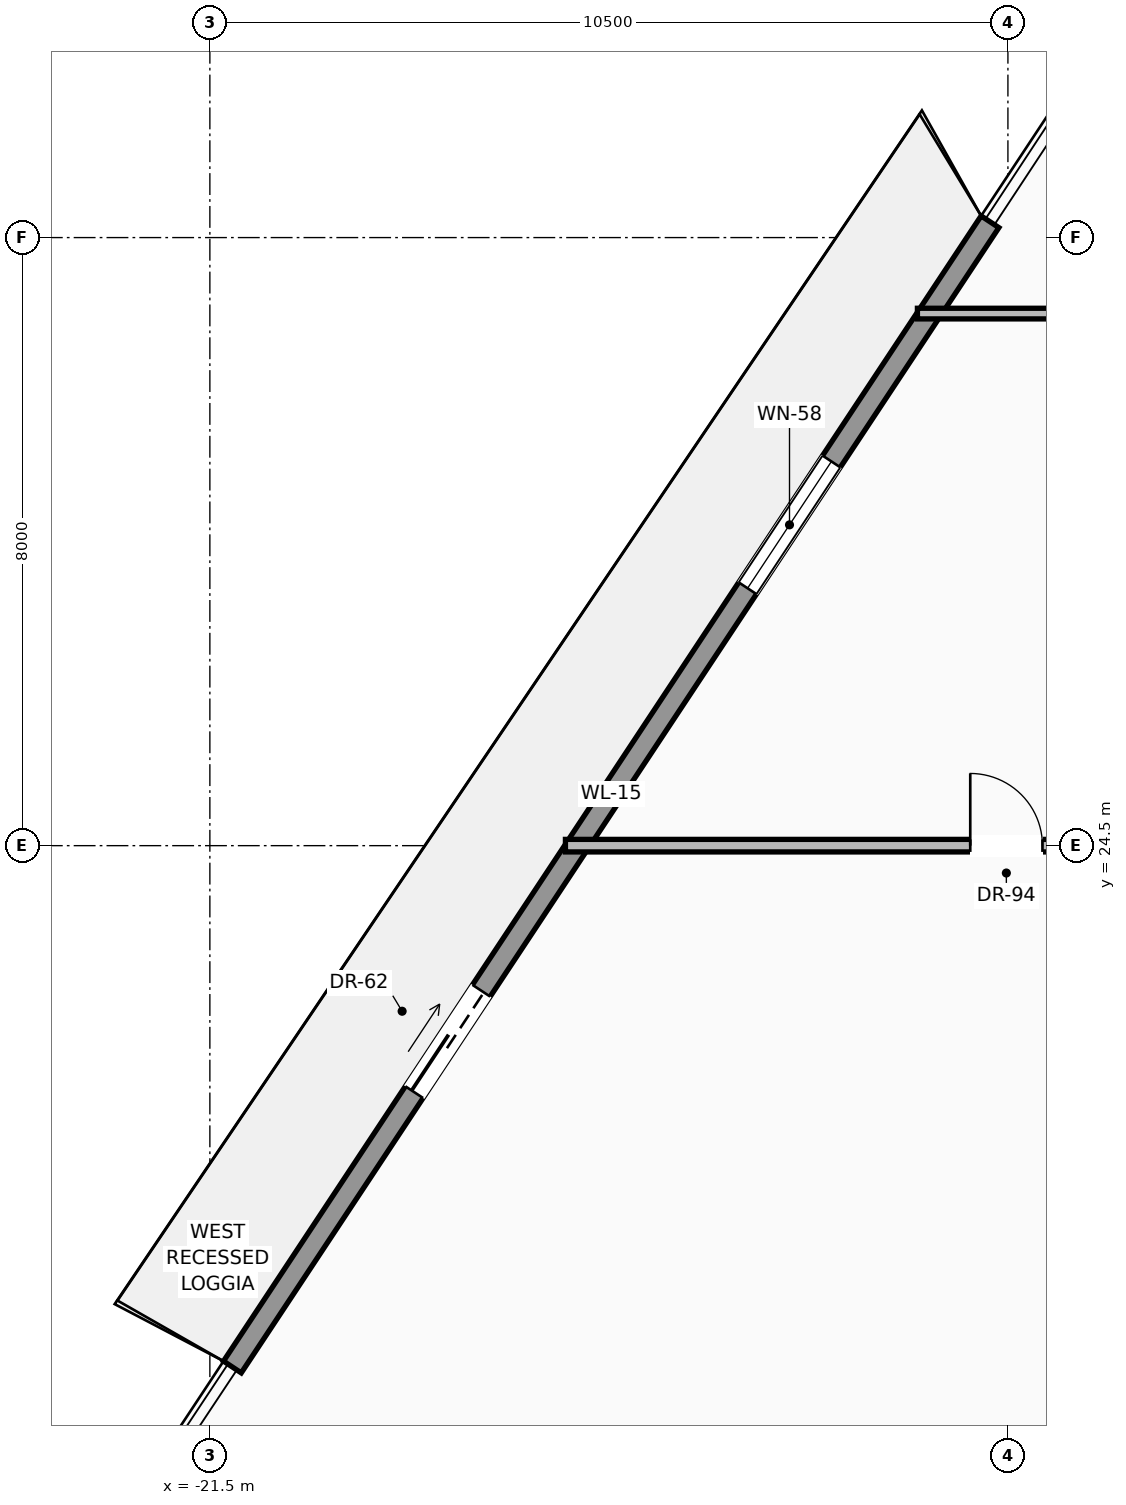
"""IFC4 building model, lengths in metres.
Left out: names, types, materials, properties, quantities, classifications, styles, units other than length and angle.
Written with IfcOpenShell. Run it as: python <this file> out.ifc"""

import sys

from ifc_helpers import new_model, si_unit, direction, frame, frame_2d, origin, place, context, subcontext, project, spatial, rectangle, extrude, source, transform, mapped, element, fill, save


model = new_model("IFC4")
c1 = context("Model", 3, precision=1e-05, world=origin(), true_north=direction((0.0, 1.0)))
c2 = subcontext(c1, "Body", "Model", "MODEL_VIEW")
j1 = project(units=[si_unit("LENGTHUNIT", "METRE"), si_unit("PLANEANGLEUNIT", "RADIAN")], contexts=[c1])
p1 = place(None, origin())
s1 = spatial("IfcSite", under=j1, at=p1, CompositionType="ELEMENT")
p2 = place(p1, origin())
s2 = spatial("IfcBuilding", under=s1, at=p2, CompositionType="ELEMENT")
p3 = place(p2, frame((0.0, 0.0, 121.0)))
s3 = spatial("IfcBuildingStorey", under=s2, at=p3, CompositionType="ELEMENT", Elevation=121.0)
p4 = place(p3, frame((-21.204, 17.641, 0.0), z_axis=(0.0, 0.0, 1.0), x_axis=(0.551762134215, 0.834001527125, 0.0)))
e1 = element("IfcWall", 1, at=p4, inside=s3, PredefinedType="SOLIDWALL", context=c2, shape_type="SweptSolid", body=[
    extrude(rectangle(XDim=18.066, YDim=0.28, at=frame_2d((9.033, 0.0))), origin(), (0.0, 0.0, 1.0), 3.95),
])
p5 = place(p4, frame((4.336, 0.0, 0.0)))
e2 = element("IfcOpeningElement", 2, at=p5, cuts=e1, PredefinedType="OPENING", context=c2, shape_type="SweptSolid", body=[
    extrude(rectangle(XDim=1.6, YDim=2.35, at=frame_2d((0.8, 1.175))), frame((0.0, 0.15, 0.0), z_axis=(0.0, -1.0, 0.0), x_axis=(1.0, 0.0, 0.0)), (0.0, 0.0, 1.0), 0.3),
])
p6 = place(p4, frame((12.285, 0.0, 0.9)))
e3 = element("IfcOpeningElement", 3, at=p6, cuts=e1, PredefinedType="OPENING", context=c2, shape_type="SweptSolid", body=[
    extrude(rectangle(XDim=2.0, YDim=1.55, at=frame_2d((1.0, 0.775))), frame((0.0, 0.15, 0.0), z_axis=(0.0, -1.0, 0.0), x_axis=(1.0, 0.0, 0.0)), (0.0, 0.0, 1.0), 0.3),
])
p7 = place(p3, frame((-16.822, 24.5, 0.0), z_axis=(0.0, 0.0, 1.0), x_axis=(1.0, 0.0, 0.0)))
e4 = element("IfcWall", 4, at=p7, inside=s3, PredefinedType="PARTITIONING", context=c2, shape_type="SweptSolid", body=[
    extrude(rectangle(XDim=34.168, YDim=0.165, at=frame_2d((17.084, 0.0))), origin(), (0.0, 0.0, 1.0), 3.746),
])
p8 = place(p7, frame((16.084, 0.0, 0.0)))
e5 = element("IfcOpeningElement", 5, at=p8, cuts=e4, PredefinedType="OPENING", context=c2, shape_type="SweptSolid", body=[
    extrude(rectangle(XDim=2.0, YDim=2.4, at=frame_2d((1.0, 1.2))), frame((0.0, 0.093, 0.0), z_axis=(0.0, -1.0, 0.0), x_axis=(1.0, 0.0, 0.0)), (0.0, 0.0, 1.0), 0.185),
])
p9 = place(p7, frame((5.326, 0.0, 0.0)))
e6 = element("IfcOpeningElement", 6, at=p9, cuts=e4, PredefinedType="OPENING", context=c2, shape_type="SweptSolid", body=[
    extrude(rectangle(XDim=0.95, YDim=2.2, at=frame_2d((0.475, 1.1))), frame((0.0, 0.093, 0.0), z_axis=(0.0, -1.0, 0.0), x_axis=(1.0, 0.0, 0.0)), (0.0, 0.0, 1.0), 0.185),
])
p10 = place(p7, frame((27.637, 0.0, 0.0)))
e7 = element("IfcOpeningElement", 7, at=p10, cuts=e4, PredefinedType="OPENING", context=c2, shape_type="SweptSolid", body=[
    extrude(rectangle(XDim=0.95, YDim=2.2, at=frame_2d((0.475, 1.1))), frame((0.0, 0.093, 0.0), z_axis=(0.0, -1.0, 0.0), x_axis=(1.0, 0.0, 0.0)), (0.0, 0.0, 1.0), 0.185),
])
p11 = place(p3, frame((-12.191, 31.5, 0.0), z_axis=(0.0, 0.0, 1.0), x_axis=(1.0, 0.0, 0.0)))
e8 = element("IfcWall", 8, at=p11, inside=s3, PredefinedType="PARTITIONING", context=c2, shape_type="SweptSolid", body=[
    extrude(rectangle(XDim=6.691, YDim=0.14, at=frame_2d((3.345, 0.0))), origin(), (0.0, 0.0, 1.0), 3.746),
])
p12 = place(p11, frame((2.57, 0.0, 0.0)))
e9 = element("IfcOpeningElement", 9, at=p12, cuts=e8, PredefinedType="OPENING", context=c2, shape_type="SweptSolid", body=[
    extrude(rectangle(XDim=0.95, YDim=2.2, at=frame_2d((0.475, 1.1))), frame((0.0, 0.08, 0.0), z_axis=(0.0, -1.0, 0.0), x_axis=(1.0, 0.0, 0.0)), (0.0, 0.0, 1.0), 0.16),
])
m1 = source(origin(), c2, "Body", "SweptSolid", [
    extrude(rectangle(XDim=1.6, YDim=2.35, at=frame_2d((0.8, 1.175))), frame((0.0, 0.025, 0.0), z_axis=(0.0, -1.0, 0.0), x_axis=(1.0, 0.0, 0.0)), (0.0, 0.0, 1.0), 0.05),
])
p13 = place(p5, origin())
e10 = element("IfcDoor", 10, at=p13, inside=s3, OperationType="SLIDING_TO_LEFT", PredefinedType="DOOR", context=c2, shape_type="MappedRepresentation", body=[
    mapped(m1, transform((0.0, 0.0, 0.0), scale=1.0)),
])
fill(e2, e10)
m2 = source(origin(), c2, "Body", "SweptSolid", [
    extrude(rectangle(XDim=2.0, YDim=1.55, at=frame_2d((1.0, 0.775))), frame((0.0, 0.03, 0.0), z_axis=(0.0, -1.0, 0.0), x_axis=(1.0, 0.0, 0.0)), (0.0, 0.0, 1.0), 0.06),
])
p14 = place(p6, origin())
e11 = element("IfcWindow", 11, at=p14, inside=s3, PartitioningType="SINGLE_PANEL", PredefinedType="WINDOW", context=c2, shape_type="MappedRepresentation", body=[
    mapped(m2, transform((0.0, 0.0, 0.0), scale=1.0)),
])
fill(e3, e11)
m3 = source(origin(), c2, "Body", "SweptSolid", [
    extrude(rectangle(XDim=0.95, YDim=2.2, at=frame_2d((0.475, 1.1))), frame((0.0, 0.025, 0.0), z_axis=(0.0, -1.0, 0.0), x_axis=(1.0, 0.0, 0.0)), (0.0, 0.0, 1.0), 0.05),
])
p15 = place(p9, origin())
e12 = element("IfcDoor", 12, at=p15, inside=s3, OperationType="SINGLE_SWING_LEFT", PredefinedType="DOOR", context=c2, shape_type="MappedRepresentation", body=[
    mapped(m3, transform((0.0, 0.0, 0.0), scale=1.0)),
])
fill(e6, e12)
save(model, sys.argv[1])
